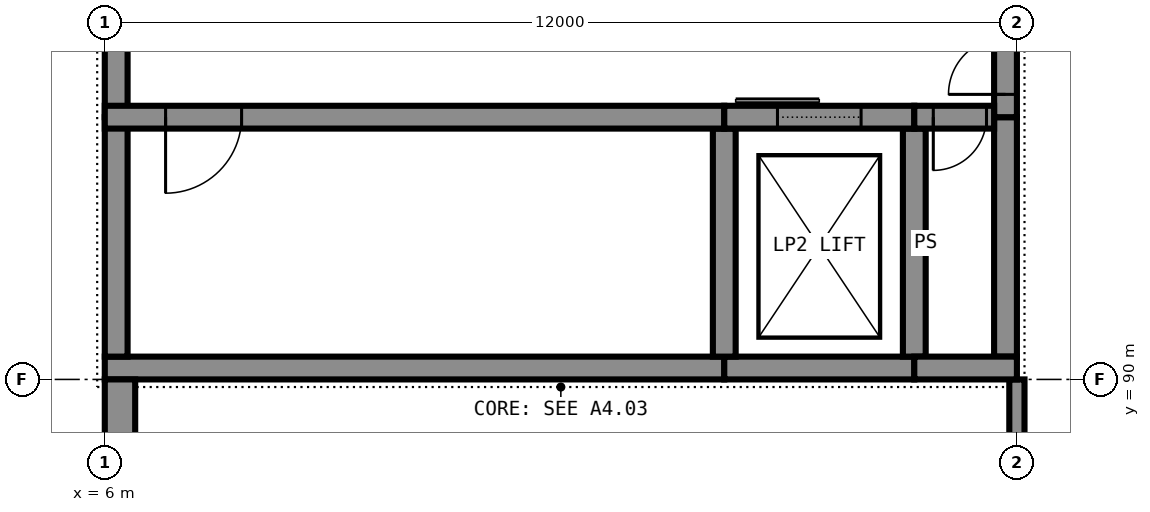
"""IFC4 building model, lengths in metres.
Left out: names, types, materials, properties, quantities, classifications, styles, units other than length and angle.
Written with IfcOpenShell. Run it as: python <this file> out.ifc"""

import sys

from ifc_helpers import new_model, si_unit, direction, frame, frame_2d, origin, place, context, subcontext, project, spatial, rectangle, extrude, element, fill, save


model = new_model("IFC4")
c1 = context("Model", 3, precision=1e-05, world=origin(), true_north=direction((0.0, 1.0)))
c2 = subcontext(c1, "Body", "Model", "MODEL_VIEW")
j1 = project(units=[si_unit("LENGTHUNIT", "METRE"), si_unit("PLANEANGLEUNIT", "RADIAN")], contexts=[c1])
p1 = place(None, origin())
s1 = spatial("IfcSite", under=j1, at=p1, CompositionType="ELEMENT")
p2 = place(p1, origin())
s2 = spatial("IfcBuilding", under=s1, at=p2, CompositionType="ELEMENT")
p3 = place(p2, frame((0.0, 0.0, -6.0)))
s3 = spatial("IfcBuildingStorey", under=s2, at=p3, CompositionType="ELEMENT", Elevation=-6.0)
p4 = place(p3, frame((6.0, 90.15, 0.0), z_axis=(0.0, 0.0, 1.0), x_axis=(1.0, 0.0, 0.0)))
e1 = element("IfcWall", 1, at=p4, inside=s3, PredefinedType="SHEAR", context=c2, shape_type="SweptSolid", body=[
    extrude(rectangle(XDim=8.15, YDim=0.3, at=frame_2d((4.075, 0.0))), origin(), (0.0, 0.0, 1.0), 5.7),
])
p5 = place(p3, frame((14.15, 90.15, 0.0), z_axis=(0.0, 0.0, 1.0), x_axis=(1.0, 0.0, 0.0)))
e2 = element("IfcWall", 2, at=p5, inside=s3, PredefinedType="SHEAR", context=c2, shape_type="SweptSolid", body=[
    extrude(rectangle(XDim=2.5, YDim=0.3, at=frame_2d((1.25, 0.0))), origin(), (0.0, 0.0, 1.0), 5.7),
])
p6 = place(p3, frame((16.65, 90.15, 0.0), z_axis=(0.0, 0.0, 1.0), x_axis=(1.0, 0.0, 0.0)))
e3 = element("IfcWall", 3, at=p6, inside=s3, PredefinedType="SHEAR", context=c2, shape_type="SweptSolid", body=[
    extrude(rectangle(XDim=1.35, YDim=0.3, at=frame_2d((0.675, 0.0))), origin(), (0.0, 0.0, 1.0), 5.7),
])
p7 = place(p3, frame((6.0, 93.45, 0.0), z_axis=(0.0, 0.0, 1.0), x_axis=(1.0, 0.0, 0.0)))
e4 = element("IfcWall", 4, at=p7, inside=s3, PredefinedType="SHEAR", context=c2, shape_type="SweptSolid", body=[
    extrude(rectangle(XDim=8.15, YDim=0.3, at=frame_2d((4.075, 0.0))), origin(), (0.0, 0.0, 1.0), 5.7),
])
p8 = place(p7, frame((0.8, 0.0, 0.0)))
e5 = element("IfcOpeningElement", 5, at=p8, cuts=e4, PredefinedType="OPENING", context=c2, shape_type="SweptSolid", body=[
    extrude(rectangle(XDim=1.0, YDim=2.1, at=frame_2d((0.5, 1.05))), frame((0.0, 0.16, 0.0), z_axis=(0.0, -1.0, 0.0), x_axis=(1.0, 0.0, 0.0)), (0.0, 0.0, 1.0), 0.32),
])
p9 = place(p3, frame((14.15, 93.45, 0.0), z_axis=(0.0, 0.0, 1.0), x_axis=(1.0, 0.0, 0.0)))
e6 = element("IfcWall", 6, at=p9, inside=s3, PredefinedType="SHEAR", context=c2, shape_type="SweptSolid", body=[
    extrude(rectangle(XDim=2.5, YDim=0.3, at=frame_2d((1.25, 0.0))), origin(), (0.0, 0.0, 1.0), 5.7),
])
p10 = place(p9, frame((0.7, 0.0, 0.0)))
e7 = element("IfcOpeningElement", 7, at=p10, cuts=e6, PredefinedType="OPENING", context=c2, shape_type="SweptSolid", body=[
    extrude(rectangle(XDim=1.1, YDim=2.1, at=frame_2d((0.55, 1.05))), frame((0.0, 0.16, 0.0), z_axis=(0.0, -1.0, 0.0), x_axis=(1.0, 0.0, 0.0)), (0.0, 0.0, 1.0), 0.32),
])
p11 = place(p3, frame((16.65, 93.45, 0.0), z_axis=(0.0, 0.0, 1.0), x_axis=(1.0, 0.0, 0.0)))
e8 = element("IfcWall", 8, at=p11, inside=s3, PredefinedType="SHEAR", context=c2, shape_type="SweptSolid", body=[
    extrude(rectangle(XDim=1.05, YDim=0.3, at=frame_2d((0.525, 0.0))), origin(), (0.0, 0.0, 1.0), 5.7),
])
p12 = place(p11, frame((0.25, 0.0, 0.0)))
e9 = element("IfcOpeningElement", 9, at=p12, cuts=e8, PredefinedType="OPENING", context=c2, shape_type="SweptSolid", body=[
    extrude(rectangle(XDim=0.7, YDim=2.1, at=frame_2d((0.35, 1.05))), frame((0.0, 0.16, 0.0), z_axis=(0.0, -1.0, 0.0), x_axis=(1.0, 0.0, 0.0)), (0.0, 0.0, 1.0), 0.32),
])
p13 = place(p3, frame((6.15, 90.3, 0.0), z_axis=(0.0, 0.0, 1.0), x_axis=(0.0, 1.0, 0.0)))
e10 = element("IfcWall", 10, at=p13, inside=s3, PredefinedType="SHEAR", context=c2, shape_type="SweptSolid", body=[
    extrude(rectangle(XDim=3.15, YDim=0.3, at=frame_2d((1.575, 0.0))), origin(), (0.0, 0.0, 1.0), 5.7),
])
p14 = place(p3, frame((6.15, 93.45, 0.0), z_axis=(0.0, 0.0, 1.0), x_axis=(0.0, 1.0, 0.0)))
e11 = element("IfcWall", 11, at=p14, inside=s3, PredefinedType="SHEAR", context=c2, shape_type="SweptSolid", body=[
    extrude(rectangle(XDim=5.1, YDim=0.3, at=frame_2d((2.55, 0.0))), origin(), (0.0, 0.0, 1.0), 5.7),
])
p15 = place(p3, frame((17.85, 90.3, 0.0), z_axis=(0.0, 0.0, 1.0), x_axis=(0.0, 1.0, 0.0)))
e12 = element("IfcWall", 12, at=p15, inside=s3, PredefinedType="SHEAR", context=c2, shape_type="SweptSolid", body=[
    extrude(rectangle(XDim=3.15, YDim=0.3, at=frame_2d((1.575, 0.0))), origin(), (0.0, 0.0, 1.0), 5.7),
])
p16 = place(p3, frame((17.85, 93.45, 0.0), z_axis=(0.0, 0.0, 1.0), x_axis=(0.0, 1.0, 0.0)))
e13 = element("IfcWall", 13, at=p16, inside=s3, PredefinedType="SHEAR", context=c2, shape_type="SweptSolid", body=[
    extrude(rectangle(XDim=5.1, YDim=0.3, at=frame_2d((2.55, 0.0))), origin(), (0.0, 0.0, 1.0), 5.7),
])
p17 = place(p16, frame((0.3, 0.0, 0.0)))
e14 = element("IfcOpeningElement", 14, at=p17, cuts=e13, PredefinedType="OPENING", context=c2, shape_type="SweptSolid", body=[
    extrude(rectangle(XDim=1.5, YDim=2.1, at=frame_2d((0.75, 1.05))), frame((0.0, 0.16, 0.0), z_axis=(0.0, -1.0, 0.0), x_axis=(1.0, 0.0, 0.0)), (0.0, 0.0, 1.0), 0.32),
])
for number, where, z_axis, x_axis in (
    (15, (14.15, 90.3, 0.0), (0.0, 0.0, 1.0), (0.0, 1.0, 0.0)),
    (16, (16.65, 90.3, 0.0), (0.0, 0.0, 1.0), (0.0, 1.0, 0.0)),
):
    element("IfcWall", number, at=place(p3, frame(where, z_axis=z_axis, x_axis=x_axis)), inside=s3, PredefinedType="SHEAR", context=c2, shape_type="SweptSolid", body=[
        extrude(rectangle(XDim=3.0, YDim=0.3, at=frame_2d((1.5, 0.0))), origin(), (0.0, 0.0, 1.0), 5.7),
    ])
p18 = place(p3, frame((6.2, 78.5, 0.0), z_axis=(0.0, 0.0, 1.0), x_axis=(0.0, 1.0, 0.0)))
e17 = element("IfcWall", 17, at=p18, inside=s3, PredefinedType="SOLIDWALL", context=c2, shape_type="SweptSolid", body=[
    extrude(rectangle(XDim=11.5, YDim=0.4, at=frame_2d((5.75, 0.0))), origin(), (0.0, 0.0, 1.0), 5.7),
])
p19 = place(p3, frame((18.0, 66.1, 0.0), z_axis=(0.0, 0.0, 1.0), x_axis=(0.0, 1.0, 0.0)))
e18 = element("IfcWall", 18, at=p19, inside=s3, PredefinedType="PARTITIONING", context=c2, shape_type="SweptSolid", body=[
    extrude(rectangle(XDim=23.9, YDim=0.2, at=frame_2d((11.95, 0.0))), origin(), (0.0, 0.0, 1.0), 4.7),
])
p20 = place(p19, frame((5.3, 0.0, 0.0)))
e19 = element("IfcOpeningElement", 19, at=p20, cuts=e18, PredefinedType="OPENING", context=c2, shape_type="SweptSolid", body=[
    extrude(rectangle(XDim=1.2, YDim=2.1, at=frame_2d((0.6, 1.05))), frame((0.0, 0.11, 0.0), z_axis=(0.0, -1.0, 0.0), x_axis=(1.0, 0.0, 0.0)), (0.0, 0.0, 1.0), 0.22),
])
p21 = place(p19, frame((17.3, 0.0, 0.0)))
e20 = element("IfcOpeningElement", 20, at=p21, cuts=e18, PredefinedType="OPENING", context=c2, shape_type="SweptSolid", body=[
    extrude(rectangle(XDim=1.2, YDim=2.1, at=frame_2d((0.6, 1.05))), frame((0.0, 0.11, 0.0), z_axis=(0.0, -1.0, 0.0), x_axis=(1.0, 0.0, 0.0)), (0.0, 0.0, 1.0), 0.22),
])
p22 = place(p8, frame((1.0, 0.0, 0.0), z_axis=(0.0, 0.0, 1.0), x_axis=(-1.0, 0.0, 0.0)))
e21 = element("IfcDoor", 21, at=p22, inside=s3, OperationType="SINGLE_SWING_LEFT", PredefinedType="DOOR", context=c2, shape_type="SweptSolid", body=[
    extrude(rectangle(XDim=1.0, YDim=2.1, at=frame_2d((0.5, 1.05))), frame((0.0, 0.025, 0.0), z_axis=(0.0, -1.0, 0.0), x_axis=(1.0, 0.0, 0.0)), (0.0, 0.0, 1.0), 0.05),
])
fill(e5, e21)
p23 = place(p10, origin())
e22 = element("IfcDoor", 22, at=p23, inside=s3, OperationType="SLIDING_TO_LEFT", PredefinedType="DOOR", context=c2, shape_type="SweptSolid", body=[
    extrude(rectangle(XDim=1.1, YDim=2.1, at=frame_2d((0.55, 1.05))), frame((0.0, 0.025, 0.0), z_axis=(0.0, -1.0, 0.0), x_axis=(1.0, 0.0, 0.0)), (0.0, 0.0, 1.0), 0.05),
])
fill(e7, e22)
p24 = place(p12, frame((0.7, 0.0, 0.0), z_axis=(0.0, 0.0, 1.0), x_axis=(-1.0, 0.0, 0.0)))
e23 = element("IfcDoor", 23, at=p24, inside=s3, OperationType="SINGLE_SWING_LEFT", PredefinedType="DOOR", context=c2, shape_type="SweptSolid", body=[
    extrude(rectangle(XDim=0.7, YDim=2.1, at=frame_2d((0.35, 1.05))), frame((0.0, 0.025, 0.0), z_axis=(0.0, -1.0, 0.0), x_axis=(1.0, 0.0, 0.0)), (0.0, 0.0, 1.0), 0.05),
])
fill(e9, e23)
p25 = place(p17, origin())
e24 = element("IfcDoor", 24, at=p25, inside=s3, OperationType="DOUBLE_DOOR_SINGLE_SWING", PredefinedType="DOOR", context=c2, shape_type="SweptSolid", body=[
    extrude(rectangle(XDim=1.5, YDim=2.1, at=frame_2d((0.75, 1.05))), frame((0.0, 0.025, 0.0), z_axis=(0.0, -1.0, 0.0), x_axis=(1.0, 0.0, 0.0)), (0.0, 0.0, 1.0), 0.05),
])
fill(e14, e24)
save(model, sys.argv[1])
